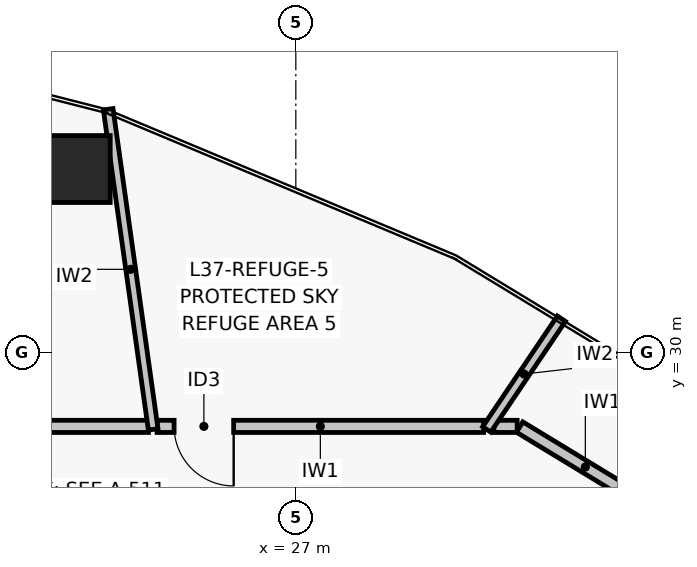
"""IFC4 building model, lengths in metres.
Left out: names, types, materials, properties, quantities, classifications, styles, units other than length and angle.
Written with IfcOpenShell. Run it as: python <this file> out.ifc"""

import sys

from ifc_helpers import new_model, si_unit, direction, frame, frame_2d, origin, origin_2d, place, context, subcontext, project, spatial, rectangle, hollow_rectangle, extrude, element, fill, save


model = new_model("IFC4")
c1 = context("Model", 3, precision=1e-05, world=origin(), true_north=direction((0.0, 1.0)))
c2 = subcontext(c1, "Body", "Model", "MODEL_VIEW")
j1 = project(units=[si_unit("LENGTHUNIT", "METRE"), si_unit("PLANEANGLEUNIT", "RADIAN")], contexts=[c1])
p1 = place(None, origin())
s1 = spatial("IfcSite", under=j1, at=p1, CompositionType="ELEMENT")
p2 = place(p1, origin())
s2 = spatial("IfcBuilding", under=s1, at=p2, CompositionType="ELEMENT")
p3 = place(p2, frame((0.0, 0.0, 148.62)))
s3 = spatial("IfcBuildingStorey", under=s2, at=p3, CompositionType="ELEMENT", Elevation=148.62)
p4 = place(p3, frame((23.397, 33.012, 0.0), z_axis=(0.0, 0.0, 1.0), x_axis=(1.0, 0.0, 0.0)))
e1 = element("IfcColumn", 1, at=p4, inside=s3, PredefinedType="COLUMN", context=c2, shape_type="SweptSolid", body=[
    extrude(hollow_rectangle(XDim=1.1, YDim=1.1, WallThickness=0.045, at=origin_2d()), origin(), (0.0, 0.0, 1.0), 5.7),
])
p5 = place(p3, frame((32.842, 27.456, 0.0), z_axis=(0.0, 0.0, 1.0), x_axis=(-0.854658937776, 0.519189849746, 0.0)))
e2 = element("IfcWall", 2, at=p5, inside=s3, PredefinedType="PARTITIONING", context=c2, shape_type="SweptSolid", body=[
    extrude(rectangle(XDim=2.528, YDim=0.2, at=frame_2d((1.264, 0.0))), origin(), (0.0, 0.0, 1.0), 4.85),
])
p6 = place(p3, frame((30.64, 28.78, 0.0), z_axis=(0.0, 0.0, 1.0), x_axis=(-1.0, 0.0, 0.0)))
e3 = element("IfcWall", 3, at=p6, inside=s3, PredefinedType="PARTITIONING", context=c2, shape_type="SweptSolid", body=[
    extrude(rectangle(XDim=0.382, YDim=0.2, at=frame_2d((0.191, 0.0))), origin(), (0.0, 0.0, 1.0), 4.85),
])
p7 = place(p3, frame((30.089, 28.78, 0.0), z_axis=(0.0, 0.0, 1.0), x_axis=(-1.0, 0.0, 0.0)))
e4 = element("IfcWall", 4, at=p7, inside=s3, PredefinedType="PARTITIONING", context=c2, shape_type="SweptSolid", body=[
    extrude(rectangle(XDim=5.371, YDim=0.2, at=frame_2d((2.686, 0.0))), origin(), (0.0, 0.0, 1.0), 4.85),
])
p8 = place(p7, frame((4.111, 0.0, 0.0)))
e5 = element("IfcOpeningElement", 5, at=p8, cuts=e4, PredefinedType="OPENING", context=c2, shape_type="SweptSolid", body=[
    extrude(rectangle(XDim=0.98, YDim=2.06, at=frame_2d((0.49, 1.03))), frame((0.0, 0.11, 0.0), z_axis=(0.0, -1.0, 0.0), x_axis=(1.0, 0.0, 0.0)), (0.0, 0.0, 1.0), 0.22),
])
p9 = place(p3, frame((24.576, 28.78, 0.0), z_axis=(0.0, 0.0, 1.0), x_axis=(-1.0, 0.0, 0.0)))
e6 = element("IfcWall", 6, at=p9, inside=s3, PredefinedType="PARTITIONING", context=c2, shape_type="SweptSolid", body=[
    extrude(rectangle(XDim=7.542, YDim=0.2, at=frame_2d((3.771, 0.0))), origin(), (0.0, 0.0, 1.0), 4.15),
])
p10 = place(p9, frame((4.031, 0.0, 0.0)))
e7 = element("IfcOpeningElement", 7, at=p10, cuts=e6, PredefinedType="OPENING", context=c2, shape_type="SweptSolid", body=[
    extrude(rectangle(XDim=0.98, YDim=2.06, at=frame_2d((0.49, 1.03))), frame((0.0, 0.11, 0.0), z_axis=(0.0, -1.0, 0.0), x_axis=(1.0, 0.0, 0.0)), (0.0, 0.0, 1.0), 0.22),
])
p11 = place(p3, frame((30.139, 28.73, 0.0), z_axis=(0.0, 0.0, 1.0), x_axis=(0.559257141169, 0.828994240059, 0.0)))
e8 = element("IfcWall", 8, at=p11, inside=s3, PredefinedType="PARTITIONING", context=c2, shape_type="SweptSolid", body=[
    extrude(rectangle(XDim=2.197, YDim=0.16, at=frame_2d((1.098, 0.0))), origin(), (0.0, 0.0, 1.0), 4.85),
])
p12 = place(p3, frame((24.654, 28.73, 0.0), z_axis=(0.0, 0.0, 1.0), x_axis=(-0.139209808081, 0.990262909198, 0.0)))
e9 = element("IfcWall", 9, at=p12, inside=s3, PredefinedType="PARTITIONING", context=c2, shape_type="SweptSolid", body=[
    extrude(rectangle(XDim=5.317, YDim=0.16, at=frame_2d((2.659, 0.0))), origin(), (0.0, 0.0, 1.0), 4.85),
])
p13 = place(p8, origin())
e10 = element("IfcDoor", 10, at=p13, inside=s3, OperationType="SINGLE_SWING_LEFT", PredefinedType="DOOR", context=c2, shape_type="SweptSolid", body=[
    extrude(rectangle(XDim=0.98, YDim=2.06, at=frame_2d((0.49, 1.03))), frame((0.0, 0.025, 0.0), z_axis=(0.0, -1.0, 0.0), x_axis=(1.0, 0.0, 0.0)), (0.0, 0.0, 1.0), 0.05),
])
fill(e5, e10)
save(model, sys.argv[1])
